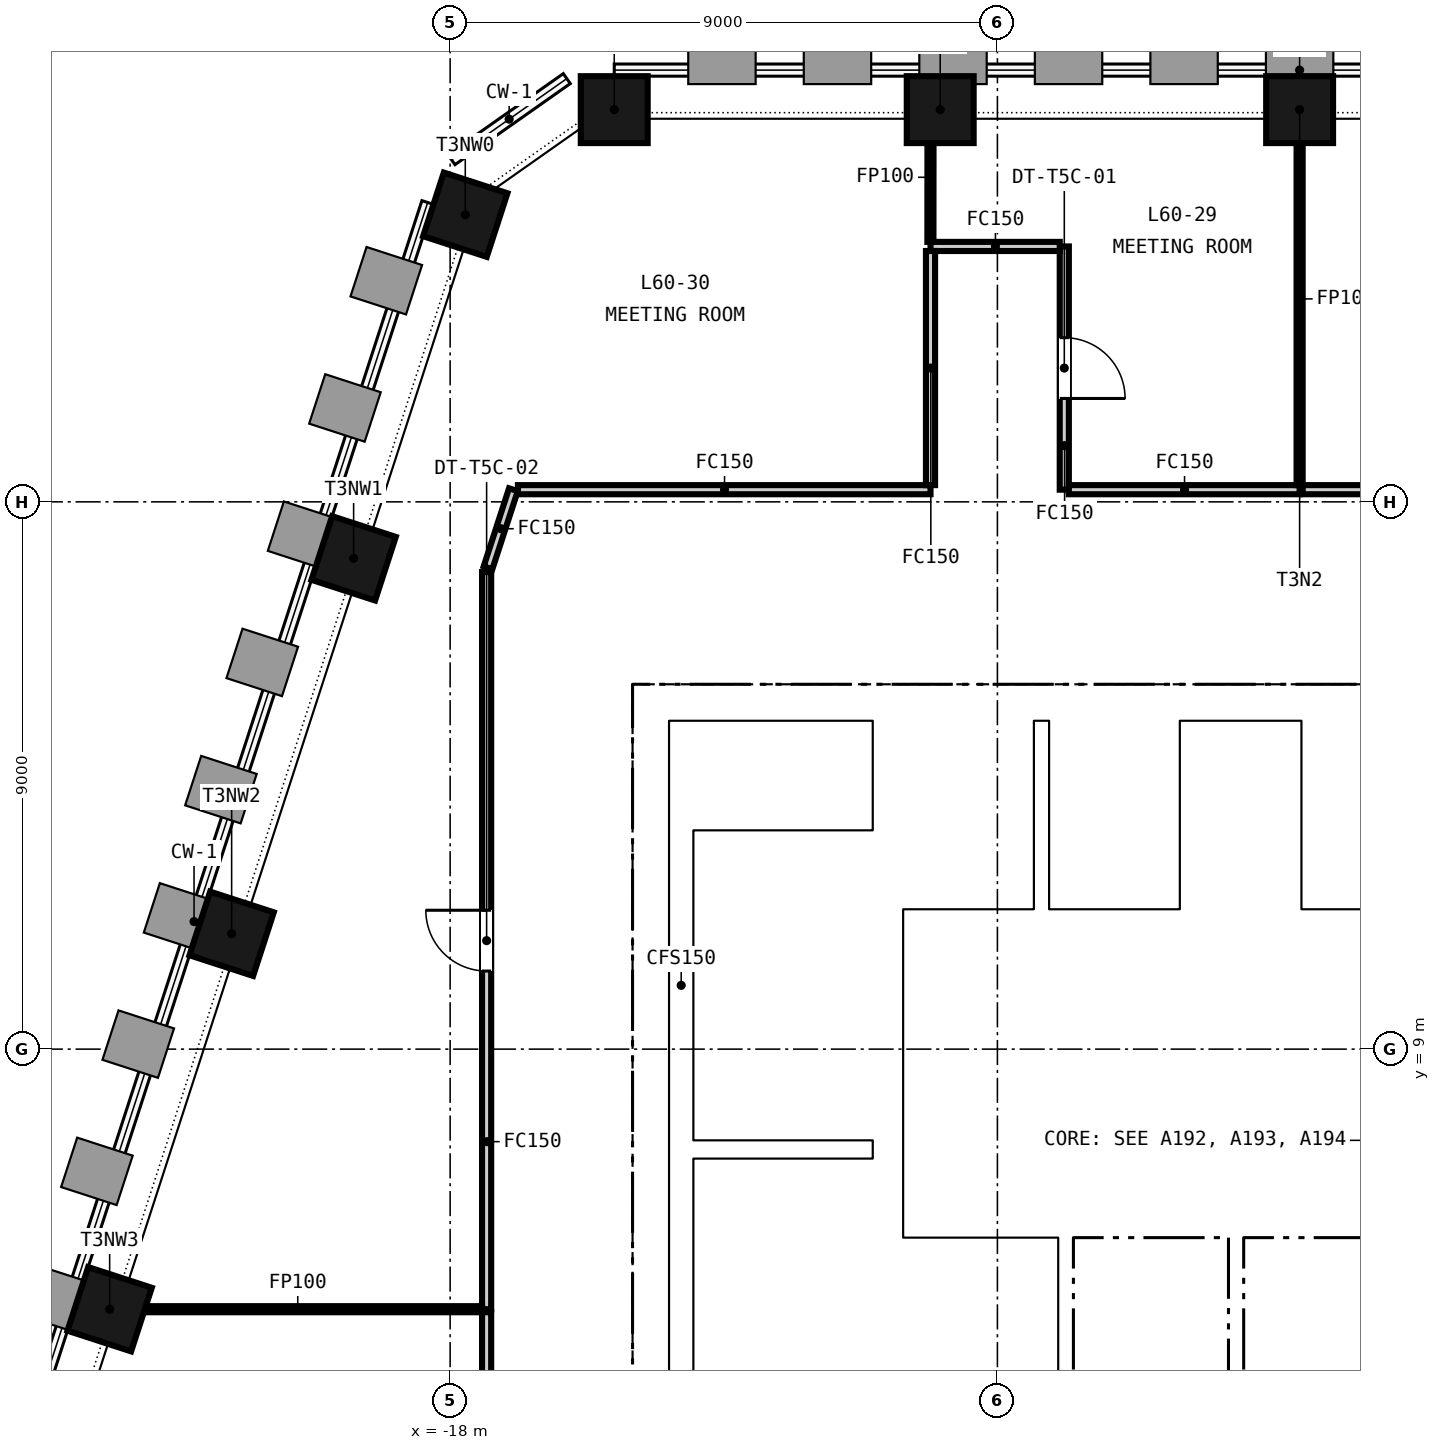
"""IFC4 building model, lengths in metres.
Left out: names, types, materials, properties, quantities, classifications, styles, units other than length and angle.
Written with IfcOpenShell. Run it as: python <this file> out.ifc"""

import sys

from ifc_helpers import new_model, si_unit, direction, frame, frame_2d, origin, origin_2d, place, context, subcontext, project, spatial, rectangle, extrude, element, fill, save


model = new_model("IFC4")
c1 = context("Model", 3, precision=1e-05, world=origin(), true_north=direction((0.0, 1.0)))
c2 = subcontext(c1, "Body", "Model", "MODEL_VIEW")
j1 = project(units=[si_unit("LENGTHUNIT", "METRE"), si_unit("PLANEANGLEUNIT", "RADIAN")], contexts=[c1])
p1 = place(None, origin())
s1 = spatial("IfcSite", under=j1, at=p1, CompositionType="ELEMENT")
p2 = place(p1, origin())
s2 = spatial("IfcBuilding", under=s1, at=p2, CompositionType="ELEMENT")
p3 = place(p2, frame((0.0, 0.0, 238.2)))
s3 = spatial("IfcBuildingStorey", under=s2, at=p3, CompositionType="ELEMENT", Elevation=238.2)
p4 = place(p3, frame((-15.0, 14.7, -0.15), z_axis=(0.0, 0.0, 1.0), x_axis=(1.0, 0.0, 0.0)))
e1 = element("IfcWall", 1, at=p4, inside=s3, PredefinedType="SOLIDWALL", context=c2, shape_type="SweptSolid", body=[
    extrude(rectangle(XDim=30.0, YDim=0.6, at=frame_2d((15.0, 0.0))), origin(), (0.0, 0.0, 1.0), 3.65),
])
p5 = place(p4, frame((9.25, 0.0, 0.15)))
e2 = element("IfcOpeningElement", 2, at=p5, cuts=e1, PredefinedType="OPENING", context=c2, shape_type="SweptSolid", body=[
    extrude(rectangle(XDim=1.5, YDim=2.1, at=frame_2d((0.75, 1.05))), frame((0.0, 0.31, 0.0), z_axis=(0.0, -1.0, 0.0), x_axis=(1.0, 0.0, 0.0)), (0.0, 0.0, 1.0), 0.62),
])
p6 = place(p4, frame((19.4, 0.0, 0.15)))
e3 = element("IfcOpeningElement", 3, at=p6, cuts=e1, PredefinedType="OPENING", context=c2, shape_type="SweptSolid", body=[
    extrude(rectangle(XDim=1.5, YDim=2.1, at=frame_2d((0.75, 1.05))), frame((0.0, 0.31, 0.0), z_axis=(0.0, -1.0, 0.0), x_axis=(1.0, 0.0, 0.0)), (0.0, 0.0, 1.0), 0.62),
])
p7 = place(p4, frame((1.5, 0.0, 0.15)))
e4 = element("IfcOpeningElement", 4, at=p7, cuts=e1, PredefinedType="OPENING", context=c2, shape_type="SweptSolid", body=[
    extrude(rectangle(XDim=1.2, YDim=2.1, at=frame_2d((0.6, 1.05))), frame((0.0, 0.31, 0.0), z_axis=(0.0, -1.0, 0.0), x_axis=(1.0, 0.0, 0.0)), (0.0, 0.0, 1.0), 0.62),
])
p8 = place(p4, frame((27.3, 0.0, 0.15)))
e5 = element("IfcOpeningElement", 5, at=p8, cuts=e1, PredefinedType="OPENING", context=c2, shape_type="SweptSolid", body=[
    extrude(rectangle(XDim=1.2, YDim=2.1, at=frame_2d((0.6, 1.05))), frame((0.0, 0.31, 0.0), z_axis=(0.0, -1.0, 0.0), x_axis=(1.0, 0.0, 0.0)), (0.0, 0.0, 1.0), 0.62),
])
p9 = place(p3, frame((-14.7, 0.6, -0.15), z_axis=(0.0, 0.0, 1.0), x_axis=(0.0, 1.0, 0.0)))
e6 = element("IfcWall", 6, at=p9, inside=s3, PredefinedType="SOLIDWALL", context=c2, shape_type="SweptSolid", body=[
    extrude(rectangle(XDim=13.8, YDim=0.6, at=frame_2d((6.9, 0.0))), origin(), (0.0, 0.0, 1.0), 3.65),
])
p10 = place(p3, frame((-10.8, 0.6, -0.15), z_axis=(0.0, 0.0, 1.0), x_axis=(0.0, 1.0, 0.0)))
e7 = element("IfcWall", 7, at=p10, inside=s3, PredefinedType="SOLIDWALL", context=c2, shape_type="SweptSolid", body=[
    extrude(rectangle(XDim=13.8, YDim=0.5, at=frame_2d((6.9, 0.0))), origin(), (0.0, 0.0, 1.0), 3.65),
])
for number, where, z_axis, x_axis in (
    (8, (-4.03, 24.45, -0.15), (0.0, 0.0, 1.0), (-1.0, 0.0, 0.0)),
    (9, (-9.941, 24.45, -0.15), (0.0, 0.0, 1.0), (-1.0, 0.0, 0.0)),
    (10, (-15.301, 24.45, -0.15), (0.0, 0.0, 1.0), (-1.0, 0.0, 0.0)),
    (11, (-17.751, 22.722, -0.15), (0.0, 0.0, 1.0), (-0.309, -0.951, 0.0)),
    (12, (-19.587, 17.071, -0.15), (0.0, 0.0, 1.0), (-0.309, -0.951, 0.0)),
    (13, (-21.593, 10.897, -0.15), (0.0, 0.0, 1.0), (-0.309, -0.951, 0.0)),
    (14, (-23.599, 4.723, -0.15), (0.0, 0.0, 1.0), (-0.309, -0.951, 0.0)),
):
    element("IfcColumn", number, at=place(p3, frame(where, z_axis=z_axis, x_axis=x_axis)), inside=s3, PredefinedType="COLUMN", context=c2, shape_type="SweptSolid", body=[
        extrude(rectangle(XDim=1.1, YDim=1.1, at=origin_2d()), origin(), (0.0, 0.0, 1.0), 3.65),
    ])
p11 = place(p3, frame((-10.55, 6.025, 0.0), z_axis=(0.0, 0.0, 1.0), x_axis=(1.0, 0.0, 0.0)))
e15 = element("IfcWall", 15, at=p11, inside=s3, PredefinedType="PARTITIONING", context=c2, shape_type="SweptSolid", body=[
    extrude(rectangle(XDim=21.1, YDim=0.25, at=frame_2d((10.55, 0.0))), origin(), (0.0, 0.0, 1.0), 3.5),
])
p12 = place(p3, frame((-4.125, 8.55, 0.0), z_axis=(0.0, 0.0, 1.0), x_axis=(1.0, 0.0, 0.0)))
e16 = element("IfcWall", 16, at=p12, inside=s3, PredefinedType="PARTITIONING", context=c2, shape_type="SweptSolid", body=[
    extrude(rectangle(XDim=14.675, YDim=0.2, at=frame_2d((7.337, 0.0))), origin(), (0.0, 0.0, 1.0), 3.5),
])
p13 = place(p12, frame((1.413, 0.0, 0.0)))
e17 = element("IfcOpeningElement", 17, at=p13, cuts=e16, PredefinedType="OPENING", context=c2, shape_type="SweptSolid", body=[
    extrude(rectangle(XDim=1.0, YDim=2.1, at=frame_2d((0.5, 1.05))), frame((0.0, 0.11, 0.0), z_axis=(0.0, -1.0, 0.0), x_axis=(1.0, 0.0, 0.0)), (0.0, 0.0, 1.0), 0.22),
])
p14 = place(p12, frame((5.0, 0.0, 0.0)))
e18 = element("IfcOpeningElement", 18, at=p14, cuts=e16, PredefinedType="OPENING", context=c2, shape_type="SweptSolid", body=[
    extrude(rectangle(XDim=1.0, YDim=2.1, at=frame_2d((0.5, 1.05))), frame((0.0, 0.11, 0.0), z_axis=(0.0, -1.0, 0.0), x_axis=(1.0, 0.0, 0.0)), (0.0, 0.0, 1.0), 0.22),
])
p15 = place(p12, frame((9.613, 0.0, 0.0)))
e19 = element("IfcOpeningElement", 19, at=p15, cuts=e16, PredefinedType="OPENING", context=c2, shape_type="SweptSolid", body=[
    extrude(rectangle(XDim=1.0, YDim=2.1, at=frame_2d((0.5, 1.05))), frame((0.0, 0.11, 0.0), z_axis=(0.0, -1.0, 0.0), x_axis=(1.0, 0.0, 0.0)), (0.0, 0.0, 1.0), 0.22),
])
p16 = place(p12, frame((13.475, 0.0, 0.0)))
e20 = element("IfcOpeningElement", 20, at=p16, cuts=e16, PredefinedType="OPENING", context=c2, shape_type="SweptSolid", body=[
    extrude(rectangle(XDim=0.9, YDim=2.1, at=frame_2d((0.45, 1.05))), frame((0.0, 0.11, 0.0), z_axis=(0.0, -1.0, 0.0), x_axis=(1.0, 0.0, 0.0)), (0.0, 0.0, 1.0), 0.22),
])
p17 = place(p3, frame((-10.55, 11.2, 0.0), z_axis=(0.0, 0.0, 1.0), x_axis=(1.0, 0.0, 0.0)))
e21 = element("IfcWall", 21, at=p17, inside=s3, PredefinedType="PARTITIONING", context=c2, shape_type="SweptSolid", body=[
    extrude(rectangle(XDim=4.8, YDim=0.2, at=frame_2d((2.4, 0.0))), origin(), (0.0, 0.0, 1.0), 3.5),
])
p18 = place(p17, frame((0.525, 0.0, 0.0)))
e22 = element("IfcOpeningElement", 22, at=p18, cuts=e21, PredefinedType="OPENING", context=c2, shape_type="SweptSolid", body=[
    extrude(rectangle(XDim=1.1, YDim=2.1, at=frame_2d((0.55, 1.05))), frame((0.0, 0.11, 0.0), z_axis=(0.0, -1.0, 0.0), x_axis=(1.0, 0.0, 0.0)), (0.0, 0.0, 1.0), 0.22),
])
p19 = place(p17, frame((2.925, 0.0, 0.0)))
e23 = element("IfcOpeningElement", 23, at=p19, cuts=e21, PredefinedType="OPENING", context=c2, shape_type="SweptSolid", body=[
    extrude(rectangle(XDim=1.1, YDim=2.1, at=frame_2d((0.55, 1.05))), frame((0.0, 0.11, 0.0), z_axis=(0.0, -1.0, 0.0), x_axis=(1.0, 0.0, 0.0)), (0.0, 0.0, 1.0), 0.22),
])
p20 = place(p3, frame((-4.25, 11.2, 0.0), z_axis=(0.0, 0.0, 1.0), x_axis=(1.0, 0.0, 0.0)))
e24 = element("IfcWall", 24, at=p20, inside=s3, PredefinedType="PARTITIONING", context=c2, shape_type="SweptSolid", body=[
    extrude(rectangle(XDim=8.65, YDim=0.2, at=frame_2d((4.325, 0.0))), origin(), (0.0, 0.0, 1.0), 3.5),
])
p21 = place(p20, frame((0.825, 0.0, 0.0)))
e25 = element("IfcOpeningElement", 25, at=p21, cuts=e24, PredefinedType="OPENING", context=c2, shape_type="SweptSolid", body=[
    extrude(rectangle(XDim=1.4, YDim=2.1, at=frame_2d((0.7, 1.05))), frame((0.0, 0.11, 0.0), z_axis=(0.0, -1.0, 0.0), x_axis=(1.0, 0.0, 0.0)), (0.0, 0.0, 1.0), 0.22),
])
p22 = place(p20, frame((3.625, 0.0, 0.0)))
e26 = element("IfcOpeningElement", 26, at=p22, cuts=e24, PredefinedType="OPENING", context=c2, shape_type="SweptSolid", body=[
    extrude(rectangle(XDim=1.4, YDim=2.1, at=frame_2d((0.7, 1.05))), frame((0.0, 0.11, 0.0), z_axis=(0.0, -1.0, 0.0), x_axis=(1.0, 0.0, 0.0)), (0.0, 0.0, 1.0), 0.22),
])
p23 = place(p20, frame((6.675, 0.0, 0.0)))
e27 = element("IfcOpeningElement", 27, at=p23, cuts=e24, PredefinedType="OPENING", context=c2, shape_type="SweptSolid", body=[
    extrude(rectangle(XDim=0.9, YDim=2.1, at=frame_2d((0.45, 1.05))), frame((0.0, 0.11, 0.0), z_axis=(0.0, -1.0, 0.0), x_axis=(1.0, 0.0, 0.0)), (0.0, 0.0, 1.0), 0.22),
])
p24 = place(p3, frame((-4.125, 6.15, 0.0), z_axis=(0.0, 0.0, 1.0), x_axis=(0.0, 1.0, 0.0)))
e28 = element("IfcWall", 28, at=p24, inside=s3, PredefinedType="PARTITIONING", context=c2, shape_type="SweptSolid", body=[
    extrude(rectangle(XDim=4.95, YDim=0.25, at=frame_2d((2.475, 0.0))), origin(), (0.0, 0.0, 1.0), 3.5),
])
p25 = place(p24, frame((3.125, 0.0, 0.0)))
e29 = element("IfcOpeningElement", 29, at=p25, cuts=e28, PredefinedType="OPENING", context=c2, shape_type="SweptSolid", body=[
    extrude(rectangle(XDim=1.2, YDim=2.1, at=frame_2d((0.6, 1.05))), frame((0.0, 0.135, 0.0), z_axis=(0.0, -1.0, 0.0), x_axis=(1.0, 0.0, 0.0)), (0.0, 0.0, 1.0), 0.27),
])
for number, where, z_axis, x_axis in (
    (30, (-7.875, 3.6, 0.0), (0.0, 0.0, 1.0), (0.0, 1.0, 0.0)),
    (31, (-5.075, 3.6, 0.0), (0.0, 0.0, 1.0), (0.0, 1.0, 0.0)),
):
    element("IfcWall", number, at=place(p3, frame(where, z_axis=z_axis, x_axis=x_axis)), inside=s3, PredefinedType="PARTITIONING", context=c2, shape_type="SweptSolid", body=[
        extrude(rectangle(XDim=2.3, YDim=0.25, at=frame_2d((1.15, 0.0))), origin(), (0.0, 0.0, 1.0), 3.5),
    ])
for number, where, z_axis, x_axis in (
    (32, (-8.275, 11.3, 0.0), (0.0, 0.0, 1.0), (0.0, 1.0, 0.0)),
    (33, (-5.875, 11.3, 0.0), (0.0, 0.0, 1.0), (0.0, 1.0, 0.0)),
    (34, (-4.125, 11.3, 0.0), (0.0, 0.0, 1.0), (0.0, 1.0, 0.0)),
):
    element("IfcWall", number, at=place(p3, frame(where, z_axis=z_axis, x_axis=x_axis)), inside=s3, PredefinedType="PARTITIONING", context=c2, shape_type="SweptSolid", body=[
        extrude(rectangle(XDim=3.1, YDim=0.25, at=frame_2d((1.55, 0.0))), origin(), (0.0, 0.0, 1.0), 3.5),
    ])
p26 = place(p3, frame((-14.0, 7.35, 0.0), z_axis=(0.0, 0.0, 1.0), x_axis=(1.0, 0.0, 0.0)))
e35 = element("IfcWall", 35, at=p26, inside=s3, PredefinedType="SOLIDWALL", context=c2, shape_type="SweptSolid", body=[
    extrude(rectangle(XDim=2.95, YDim=0.3, at=frame_2d((1.475, 0.0))), origin(), (0.0, 0.0, 1.0), 3.5),
])
p27 = place(p3, frame((-14.2, 0.6, 0.0), z_axis=(0.0, 0.0, 1.0), x_axis=(0.0, 1.0, 0.0)))
e36 = element("IfcWall", 36, at=p27, inside=s3, PredefinedType="SOLIDWALL", context=c2, shape_type="SweptSolid", body=[
    extrude(rectangle(XDim=13.8, YDim=0.4, at=frame_2d((6.9, 0.0))), origin(), (0.0, 0.0, 1.0), 3.5),
])
p28 = place(p3, frame((-7.9, 22.2, 0.0), z_axis=(0.0, 0.0, 1.0), x_axis=(0.0, -1.0, 0.0)))
e37 = element("IfcWall", 37, at=p28, inside=s3, PredefinedType="PARTITIONING", context=c2, shape_type="SweptSolid", body=[
    extrude(rectangle(XDim=4.0, YDim=0.15, at=frame_2d((2.0, 0.0))), origin(), (0.0, 0.0, 1.0), 2.751),
])
p29 = place(p28, frame((1.5, 0.0, 0.0)))
e38 = element("IfcOpeningElement", 38, at=p29, cuts=e37, PredefinedType="OPENING", context=c2, shape_type="SweptSolid", body=[
    extrude(rectangle(XDim=1.0, YDim=2.1, at=frame_2d((0.5, 1.05))), frame((0.0, 0.085, 0.0), z_axis=(0.0, -1.0, 0.0), x_axis=(1.0, 0.0, 0.0)), (0.0, 0.0, 1.0), 0.17),
])
p30 = place(p3, frame((-10.1, 22.2, 0.0), z_axis=(0.0, 0.0, 1.0), x_axis=(1.0, 0.0, 0.0)))
e39 = element("IfcWall", 39, at=p30, inside=s3, PredefinedType="PARTITIONING", context=c2, shape_type="SweptSolid", body=[
    extrude(rectangle(XDim=2.125, YDim=0.15, at=frame_2d((1.062, 0.0))), origin(), (0.0, 0.0, 1.0), 2.751),
])
p31 = place(p3, frame((-7.825, 18.2, 0.0), z_axis=(0.0, 0.0, 1.0), x_axis=(1.0, 0.0, 0.0)))
e40 = element("IfcWall", 40, at=p31, inside=s3, PredefinedType="PARTITIONING", context=c2, shape_type="SweptSolid", body=[
    extrude(rectangle(XDim=3.795, YDim=0.15, at=frame_2d((1.897, 0.0))), origin(), (0.0, 0.0, 1.0), 2.751),
])
p32 = place(p3, frame((-4.03, 18.275, 0.0), z_axis=(0.0, 0.0, 1.0), x_axis=(0.0, 1.0, 0.0)))
e41 = element("IfcWall", 41, at=p32, inside=s3, PredefinedType="PARTITIONING", context=c2, shape_type="SweptSolid", body=[
    extrude(rectangle(XDim=6.125, YDim=0.1, at=frame_2d((3.062, 0.0))), origin(), (0.0, 0.0, 1.0), 2.751),
])
p33 = place(p3, frame((-17.4, 4.723, 0.0), z_axis=(0.0, 0.0, 1.0), x_axis=(0.0, 1.0, 0.0)))
e42 = element("IfcWall", 42, at=p33, inside=s3, PredefinedType="PARTITIONING", context=c2, shape_type="SweptSolid", body=[
    extrude(rectangle(XDim=12.122, YDim=0.15, at=frame_2d((6.061, 0.0))), origin(), (0.0, 0.0, 1.0), 2.751),
])
p34 = place(p33, frame((5.561, 0.0, 0.0)))
e43 = element("IfcOpeningElement", 43, at=p34, cuts=e42, PredefinedType="OPENING", context=c2, shape_type="SweptSolid", body=[
    extrude(rectangle(XDim=1.0, YDim=2.1, at=frame_2d((0.5, 1.05))), frame((0.0, 0.085, 0.0), z_axis=(0.0, -1.0, 0.0), x_axis=(1.0, 0.0, 0.0)), (0.0, 0.0, 1.0), 0.17),
])
p35 = place(p3, frame((-17.377, 16.916, 0.0), z_axis=(0.0, 0.0, 1.0), x_axis=(0.308783376305, 0.951132391688, 0.0)))
e44 = element("IfcWall", 44, at=p35, inside=s3, PredefinedType="PARTITIONING", context=c2, shape_type="SweptSolid", body=[
    extrude(rectangle(XDim=1.35, YDim=0.15, at=frame_2d((0.675, 0.0))), origin(), (0.0, 0.0, 1.0), 2.751),
])
p36 = place(p3, frame((-16.885, 18.2, 0.0), z_axis=(0.0, 0.0, 1.0), x_axis=(1.0, 0.0, 0.0)))
e45 = element("IfcWall", 45, at=p36, inside=s3, PredefinedType="PARTITIONING", context=c2, shape_type="SweptSolid", body=[
    extrude(rectangle(XDim=6.785, YDim=0.15, at=frame_2d((3.393, 0.0))), origin(), (0.0, 0.0, 1.0), 2.751),
])
p37 = place(p3, frame((-10.1, 18.275, 0.0), z_axis=(0.0, 0.0, 1.0), x_axis=(0.0, 1.0, 0.0)))
e46 = element("IfcWall", 46, at=p37, inside=s3, PredefinedType="PARTITIONING", context=c2, shape_type="SweptSolid", body=[
    extrude(rectangle(XDim=3.85, YDim=0.15, at=frame_2d((1.925, 0.0))), origin(), (0.0, 0.0, 1.0), 2.751),
])
p38 = place(p3, frame((-10.102, 22.275, 0.0), z_axis=(0.0, 0.0, 1.0), x_axis=(0.000804227681, 0.999999676609, 0.0)))
e47 = element("IfcWall", 47, at=p38, inside=s3, PredefinedType="PARTITIONING", context=c2, shape_type="SweptSolid", body=[
    extrude(rectangle(XDim=2.125, YDim=0.1, at=frame_2d((1.062, 0.0))), origin(), (0.0, 0.0, 1.0), 2.751),
])
p39 = place(p3, frame((-23.547, 4.723, 0.0), z_axis=(0.0, 0.0, 1.0), x_axis=(1.0, 0.0, 0.0)))
e48 = element("IfcWall", 48, at=p39, inside=s3, PredefinedType="PARTITIONING", context=c2, shape_type="SweptSolid", body=[
    extrude(rectangle(XDim=6.072, YDim=0.1, at=frame_2d((3.036, 0.0))), origin(), (0.0, 0.0, 1.0), 2.751),
])
p40 = place(p3, frame((-3.98, 18.2, 0.0), z_axis=(0.0, 0.0, 1.0), x_axis=(1.0, 0.0, 0.0)))
e49 = element("IfcWall", 49, at=p40, inside=s3, PredefinedType="PARTITIONING", context=c2, shape_type="SweptSolid", body=[
    extrude(rectangle(XDim=6.38, YDim=0.15, at=frame_2d((3.19, 0.0))), origin(), (0.0, 0.0, 1.0), 2.751),
])
p41 = place(p3, frame((-17.4, -3.525, 0.0), z_axis=(0.0, 0.0, 1.0), x_axis=(0.0, 1.0, 0.0)))
e50 = element("IfcWall", 50, at=p41, inside=s3, PredefinedType="PARTITIONING", context=c2, shape_type="SweptSolid", body=[
    extrude(rectangle(XDim=8.198, YDim=0.15, at=frame_2d((4.099, 0.0))), origin(), (0.0, 0.0, 1.0), 2.751),
])
p42 = place(p41, frame((3.199, 0.0, 0.0)))
e51 = element("IfcOpeningElement", 51, at=p42, cuts=e50, PredefinedType="OPENING", context=c2, shape_type="SweptSolid", body=[
    extrude(rectangle(XDim=1.8, YDim=2.1, at=frame_2d((0.9, 1.05))), frame((0.0, 0.085, 0.0), z_axis=(0.0, -1.0, 0.0), x_axis=(1.0, 0.0, 0.0)), (0.0, 0.0, 1.0), 0.17),
])
p43 = place(p25, origin())
e52 = element("IfcDoor", 52, at=p43, inside=s3, OperationType="SINGLE_SWING_LEFT", PredefinedType="DOOR", context=c2, shape_type="SweptSolid", body=[
    extrude(rectangle(XDim=1.2, YDim=2.1, at=frame_2d((0.6, 1.05))), frame((0.0, 0.025, 0.0), z_axis=(0.0, -1.0, 0.0), x_axis=(1.0, 0.0, 0.0)), (0.0, 0.0, 1.0), 0.05),
])
fill(e29, e52)
p44 = place(p18, origin())
e53 = element("IfcDoor", 53, at=p44, inside=s3, OperationType="DOUBLE_DOOR_SLIDING", PredefinedType="DOOR", context=c2, shape_type="SweptSolid", body=[
    extrude(rectangle(XDim=1.1, YDim=2.1, at=frame_2d((0.55, 1.05))), frame((0.0, 0.025, 0.0), z_axis=(0.0, -1.0, 0.0), x_axis=(1.0, 0.0, 0.0)), (0.0, 0.0, 1.0), 0.05),
])
fill(e22, e53)
p45 = place(p19, origin())
e54 = element("IfcDoor", 54, at=p45, inside=s3, OperationType="DOUBLE_DOOR_SLIDING", PredefinedType="DOOR", context=c2, shape_type="SweptSolid", body=[
    extrude(rectangle(XDim=1.1, YDim=2.1, at=frame_2d((0.55, 1.05))), frame((0.0, 0.025, 0.0), z_axis=(0.0, -1.0, 0.0), x_axis=(1.0, 0.0, 0.0)), (0.0, 0.0, 1.0), 0.05),
])
fill(e23, e54)
p46 = place(p21, origin())
e55 = element("IfcDoor", 55, at=p46, inside=s3, OperationType="DOUBLE_DOOR_SLIDING", PredefinedType="DOOR", context=c2, shape_type="SweptSolid", body=[
    extrude(rectangle(XDim=1.4, YDim=2.1, at=frame_2d((0.7, 1.05))), frame((0.0, 0.025, 0.0), z_axis=(0.0, -1.0, 0.0), x_axis=(1.0, 0.0, 0.0)), (0.0, 0.0, 1.0), 0.05),
])
fill(e25, e55)
p47 = place(p5, origin())
e56 = element("IfcDoor", 56, at=p47, inside=s3, OperationType="DOUBLE_DOOR_SINGLE_SWING", PredefinedType="DOOR", context=c2, shape_type="SweptSolid", body=[
    extrude(rectangle(XDim=1.5, YDim=2.1, at=frame_2d((0.75, 1.05))), frame((0.0, 0.025, 0.0), z_axis=(0.0, -1.0, 0.0), x_axis=(1.0, 0.0, 0.0)), (0.0, 0.0, 1.0), 0.05),
])
fill(e2, e56)
p48 = place(p7, origin())
e57 = element("IfcDoor", 57, at=p48, inside=s3, OperationType="SINGLE_SWING_RIGHT", PredefinedType="DOOR", context=c2, shape_type="SweptSolid", body=[
    extrude(rectangle(XDim=1.2, YDim=2.1, at=frame_2d((0.6, 1.05))), frame((0.0, 0.025, 0.0), z_axis=(0.0, -1.0, 0.0), x_axis=(1.0, 0.0, 0.0)), (0.0, 0.0, 1.0), 0.05),
])
fill(e4, e57)
p49 = place(p29, origin())
e58 = element("IfcDoor", 58, at=p49, inside=s3, OperationType="SINGLE_SWING_RIGHT", PredefinedType="DOOR", context=c2, shape_type="SweptSolid", body=[
    extrude(rectangle(XDim=1.0, YDim=2.1, at=frame_2d((0.5, 1.05))), frame((0.0, 0.025, 0.0), z_axis=(0.0, -1.0, 0.0), x_axis=(1.0, 0.0, 0.0)), (0.0, 0.0, 1.0), 0.05),
])
fill(e38, e58)
p50 = place(p34, origin())
e59 = element("IfcDoor", 59, at=p50, inside=s3, OperationType="SINGLE_SWING_RIGHT", PredefinedType="DOOR", context=c2, shape_type="SweptSolid", body=[
    extrude(rectangle(XDim=1.0, YDim=2.1, at=frame_2d((0.5, 1.05))), frame((0.0, 0.025, 0.0), z_axis=(0.0, -1.0, 0.0), x_axis=(1.0, 0.0, 0.0)), (0.0, 0.0, 1.0), 0.05),
])
fill(e43, e59)
save(model, sys.argv[1])
